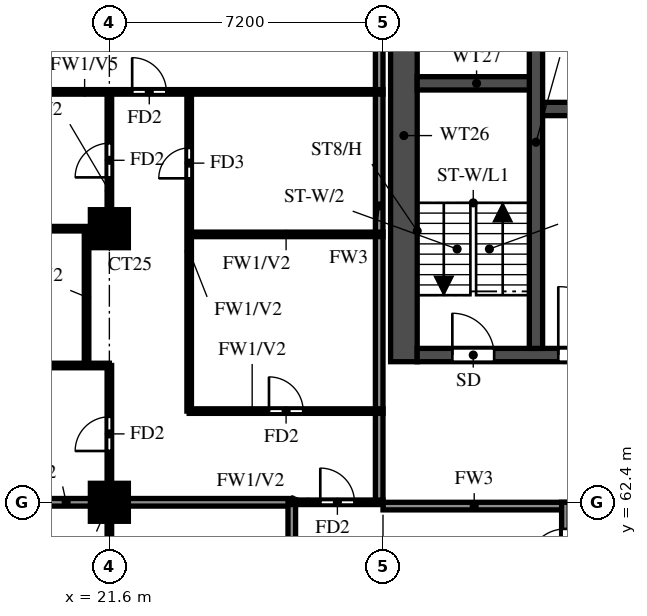
"""IFC4 building model, lengths in metres.
Left out: names, types, materials, properties, quantities, classifications, styles, units other than length and angle.
Written with IfcOpenShell. Run it as: python <this file> out.ifc"""

import sys

from ifc_helpers import new_model, si_unit, direction, frame, frame_2d, origin, origin_2d, place, context, subcontext, project, spatial, rectangle, extrude, source, transform, mapped, element, fill, save


model = new_model("IFC4")
c1 = context("Model", 3, precision=1e-05, world=origin(), true_north=direction((0.0, 1.0)))
c2 = subcontext(c1, "Body", "Model", "MODEL_VIEW")
j1 = project(units=[si_unit("LENGTHUNIT", "METRE"), si_unit("PLANEANGLEUNIT", "RADIAN")], contexts=[c1])
p1 = place(None, origin())
s1 = spatial("IfcSite", under=j1, at=p1, CompositionType="ELEMENT")
p2 = place(p1, origin())
s2 = spatial("IfcBuilding", under=s1, at=p2, CompositionType="ELEMENT")
p3 = place(p2, frame((0.0, 0.0, 167.5)))
s3 = spatial("IfcBuildingStorey", under=s2, at=p3, CompositionType="ELEMENT", Elevation=167.5)
m1 = source(origin(), c2, "Body", "SweptSolid", [
    extrude(rectangle(XDim=1.0, YDim=1.0, at=origin_2d()), origin(), (0.0, 0.0, 1.0), 3.2),
])
for number, where, z_axis, x_axis in (
    (1, (21.6, 62.4, 0.0), (0.0, 0.0, 1.0), (1.0, 0.0, 0.0)),
    (2, (21.6, 69.6, 0.0), (0.0, 0.0, 1.0), (1.0, 0.0, 0.0)),
):
    element("IfcColumn", number, at=place(p3, frame(where, z_axis=z_axis, x_axis=x_axis)), inside=s3, PredefinedType="COLUMN", context=c2, shape_type="MappedRepresentation", body=[
        mapped(m1, transform((0.0, 0.0, 0.0))),
    ])
p4 = place(p3, frame((29.35, 66.1, 0.0), z_axis=(0.0, 0.0, 1.0), x_axis=(0.0, 1.0, 0.0)))
e3 = element("IfcWall", 3, at=p4, inside=s3, PredefinedType="SHEAR", context=c2, shape_type="SweptSolid", body=[
    extrude(rectangle(XDim=11.9, YDim=0.7, at=frame_2d((5.95, 0.0))), origin(), (0.0, 0.0, 1.0), 3.2),
])
p5 = place(p3, frame((29.7, 66.275, 0.0), z_axis=(0.0, 0.0, 1.0), x_axis=(1.0, 0.0, 0.0)))
e4 = element("IfcWall", 4, at=p5, inside=s3, PredefinedType="SHEAR", context=c2, shape_type="SweptSolid", body=[
    extrude(rectangle(XDim=41.4, YDim=0.35, at=frame_2d((20.7, 0.0))), origin(), (0.0, 0.0, 1.0), 3.2),
])
p6 = place(p5, frame((0.925, 0.0, 0.0)))
e5 = element("IfcOpeningElement", 5, at=p6, cuts=e4, PredefinedType="OPENING", context=c2, shape_type="SweptSolid", body=[
    extrude(rectangle(XDim=1.1, YDim=2.1, at=frame_2d((0.55, 1.05))), frame((0.0, 0.185, 0.0), z_axis=(0.0, -1.0, 0.0), x_axis=(1.0, 0.0, 0.0)), (0.0, 0.0, 1.0), 0.37),
])
p7 = place(p5, frame((3.712, 0.0, 0.0)))
e6 = element("IfcOpeningElement", 6, at=p7, cuts=e4, PredefinedType="OPENING", context=c2, shape_type="SweptSolid", body=[
    extrude(rectangle(XDim=1.8, YDim=2.1, at=frame_2d((0.9, 1.05))), frame((0.0, 0.185, 0.0), z_axis=(0.0, -1.0, 0.0), x_axis=(1.0, 0.0, 0.0)), (0.0, 0.0, 1.0), 0.37),
])
p8 = place(p3, frame((32.825, 72.75, 0.0), z_axis=(0.0, 0.0, 1.0), x_axis=(1.0, 0.0, 0.0)))
e7 = element("IfcWall", 7, at=p8, inside=s3, PredefinedType="SHEAR", context=c2, shape_type="SweptSolid", body=[
    extrude(rectangle(XDim=35.15, YDim=0.35, at=frame_2d((17.575, 0.0))), origin(), (0.0, 0.0, 1.0), 3.2),
])
p9 = place(p8, frame((19.8, 0.0, 0.0)))
e8 = element("IfcOpeningElement", 8, at=p9, cuts=e7, PredefinedType="OPENING", context=c2, shape_type="SweptSolid", body=[
    extrude(rectangle(XDim=1.1, YDim=2.1, at=frame_2d((0.55, 1.05))), frame((0.0, 0.185, 0.0), z_axis=(0.0, -1.0, 0.0), x_axis=(1.0, 0.0, 0.0)), (0.0, 0.0, 1.0), 0.37),
])
p10 = place(p8, frame((27.7, 0.0, 0.0)))
e9 = element("IfcOpeningElement", 9, at=p10, cuts=e7, PredefinedType="OPENING", context=c2, shape_type="SweptSolid", body=[
    extrude(rectangle(XDim=1.1, YDim=2.1, at=frame_2d((0.55, 1.05))), frame((0.0, 0.185, 0.0), z_axis=(0.0, -1.0, 0.0), x_axis=(1.0, 0.0, 0.0)), (0.0, 0.0, 1.0), 0.37),
])
p11 = place(p8, frame((30.3, 0.0, 0.0)))
e10 = element("IfcOpeningElement", 10, at=p11, cuts=e7, PredefinedType="OPENING", context=c2, shape_type="SweptSolid", body=[
    extrude(rectangle(XDim=1.1, YDim=2.1, at=frame_2d((0.55, 1.05))), frame((0.0, 0.185, 0.0), z_axis=(0.0, -1.0, 0.0), x_axis=(1.0, 0.0, 0.0)), (0.0, 0.0, 1.0), 0.37),
])
p12 = place(p8, frame((3.8, 0.0, 0.0)))
e11 = element("IfcOpeningElement", 11, at=p12, cuts=e7, PredefinedType="OPENING", context=c2, shape_type="SweptSolid", body=[
    extrude(rectangle(XDim=1.1, YDim=2.1, at=frame_2d((0.55, 1.05))), frame((0.0, 0.185, 0.0), z_axis=(0.0, -1.0, 0.0), x_axis=(1.0, 0.0, 0.0)), (0.0, 0.0, 1.0), 0.37),
])
p13 = place(p8, frame((6.55, 0.0, 0.0)))
e12 = element("IfcOpeningElement", 12, at=p13, cuts=e7, PredefinedType="OPENING", context=c2, shape_type="SweptSolid", body=[
    extrude(rectangle(XDim=1.1, YDim=2.1, at=frame_2d((0.55, 1.05))), frame((0.0, 0.185, 0.0), z_axis=(0.0, -1.0, 0.0), x_axis=(1.0, 0.0, 0.0)), (0.0, 0.0, 1.0), 0.37),
])
p14 = place(p8, frame((9.3, 0.0, 0.0)))
e13 = element("IfcOpeningElement", 13, at=p14, cuts=e7, PredefinedType="OPENING", context=c2, shape_type="SweptSolid", body=[
    extrude(rectangle(XDim=1.1, YDim=2.1, at=frame_2d((0.55, 1.05))), frame((0.0, 0.185, 0.0), z_axis=(0.0, -1.0, 0.0), x_axis=(1.0, 0.0, 0.0)), (0.0, 0.0, 1.0), 0.37),
])
p15 = place(p8, frame((12.05, 0.0, 0.0)))
e14 = element("IfcOpeningElement", 14, at=p15, cuts=e7, PredefinedType="OPENING", context=c2, shape_type="SweptSolid", body=[
    extrude(rectangle(XDim=1.1, YDim=2.1, at=frame_2d((0.55, 1.05))), frame((0.0, 0.185, 0.0), z_axis=(0.0, -1.0, 0.0), x_axis=(1.0, 0.0, 0.0)), (0.0, 0.0, 1.0), 0.37),
])
p16 = place(p8, frame((14.8, 0.0, 0.0)))
e15 = element("IfcOpeningElement", 15, at=p16, cuts=e7, PredefinedType="OPENING", context=c2, shape_type="SweptSolid", body=[
    extrude(rectangle(XDim=1.1, YDim=2.1, at=frame_2d((0.55, 1.05))), frame((0.0, 0.185, 0.0), z_axis=(0.0, -1.0, 0.0), x_axis=(1.0, 0.0, 0.0)), (0.0, 0.0, 1.0), 0.37),
])
p17 = place(p8, frame((17.55, 0.0, 0.0)))
e16 = element("IfcOpeningElement", 16, at=p17, cuts=e7, PredefinedType="OPENING", context=c2, shape_type="SweptSolid", body=[
    extrude(rectangle(XDim=1.1, YDim=2.1, at=frame_2d((0.55, 1.05))), frame((0.0, 0.185, 0.0), z_axis=(0.0, -1.0, 0.0), x_axis=(1.0, 0.0, 0.0)), (0.0, 0.0, 1.0), 0.37),
])
p18 = place(p8, frame((0.938, 0.0, 0.0)))
e17 = element("IfcOpeningElement", 17, at=p18, cuts=e7, PredefinedType="OPENING", context=c2, shape_type="SweptSolid", body=[
    extrude(rectangle(XDim=1.1, YDim=2.1, at=frame_2d((0.55, 1.05))), frame((0.0, 0.185, 0.0), z_axis=(0.0, -1.0, 0.0), x_axis=(1.0, 0.0, 0.0)), (0.0, 0.0, 1.0), 0.37),
])
p19 = place(p3, frame((29.7, 73.425, 0.0), z_axis=(0.0, 0.0, 1.0), x_axis=(1.0, 0.0, 0.0)))
e18 = element("IfcWall", 18, at=p19, inside=s3, PredefinedType="SHEAR", context=c2, shape_type="SweptSolid", body=[
    extrude(rectangle(XDim=3.125, YDim=0.35, at=frame_2d((1.562, 0.0))), origin(), (0.0, 0.0, 1.0), 3.2),
])
p20 = place(p3, frame((32.825, 66.45, 0.0), z_axis=(0.0, 0.0, 1.0), x_axis=(0.0, 1.0, 0.0)))
e19 = element("IfcWall", 19, at=p20, inside=s3, PredefinedType="SHEAR", context=c2, shape_type="SweptSolid", body=[
    extrude(rectangle(XDim=10.85, YDim=0.35, at=frame_2d((5.425, 0.0))), origin(), (0.0, 0.0, 1.0), 3.2),
])
p21 = place(p3, frame((28.8, 62.3, 0.0), z_axis=(0.0, 0.0, 1.0), x_axis=(1.0, 0.0, 0.0)))
e20 = element("IfcWall", 20, at=p21, inside=s3, PredefinedType="SOLIDWALL", context=c2, shape_type="SweptSolid", body=[
    extrude(rectangle(XDim=4.8, YDim=0.2, at=frame_2d((2.4, 0.0))), origin(), (0.0, 0.0, 1.0), 3.2),
])
p22 = place(p3, frame((28.7, 62.4, 0.0), z_axis=(0.0, 0.0, 1.0), x_axis=(0.0, 1.0, 0.0)))
e21 = element("IfcWall", 21, at=p22, inside=s3, PredefinedType="SOLIDWALL", context=c2, shape_type="SweptSolid", body=[
    extrude(rectangle(XDim=15.6, YDim=0.2, at=frame_2d((7.8, 0.0))), origin(), (0.0, 0.0, 1.0), 3.2),
])
p23 = place(p3, frame((33.6, 60.0, 0.0), z_axis=(0.0, 0.0, 1.0), x_axis=(0.0, 1.0, 0.0)))
e22 = element("IfcWall", 22, at=p23, inside=s3, PredefinedType="SOLIDWALL", context=c2, shape_type="SweptSolid", body=[
    extrude(rectangle(XDim=2.4, YDim=0.2, at=frame_2d((1.2, 0.0))), origin(), (0.0, 0.0, 1.0), 3.2),
])
p24 = place(p23, frame((0.7, 0.0, 0.0)))
e23 = element("IfcOpeningElement", 23, at=p24, cuts=e22, PredefinedType="OPENING", context=c2, shape_type="SweptSolid", body=[
    extrude(rectangle(XDim=1.0, YDim=2.1, at=frame_2d((0.5, 1.05))), frame((0.0, 0.11, 0.0), z_axis=(0.0, -1.0, 0.0), x_axis=(1.0, 0.0, 0.0)), (0.0, 0.0, 1.0), 0.22),
])
p25 = place(p3, frame((14.525, 62.4, 0.0), z_axis=(0.0, 0.0, 1.0), x_axis=(1.0, 0.0, 0.0)))
e24 = element("IfcWall", 24, at=p25, inside=s3, PredefinedType="SOLIDWALL", context=c2, shape_type="SweptSolid", body=[
    extrude(rectangle(XDim=11.875, YDim=0.2, at=frame_2d((5.938, 0.0))), origin(), (0.0, 0.0, 1.0), 3.2),
])
p26 = place(p3, frame((26.4, 60.0, 0.0), z_axis=(0.0, 0.0, 1.0), x_axis=(0.0, 1.0, 0.0)))
e25 = element("IfcWall", 25, at=p26, inside=s3, PredefinedType="SOLIDWALL", context=c2, shape_type="SweptSolid", body=[
    extrude(rectangle(XDim=2.4, YDim=0.2, at=frame_2d((1.2, 0.0))), origin(), (0.0, 0.0, 1.0), 3.2),
])
p27 = place(p3, frame((26.4, 62.4, 0.0), z_axis=(0.0, 0.0, 1.0), x_axis=(1.0, 0.0, 0.0)))
e26 = element("IfcWall", 26, at=p27, inside=s3, PredefinedType="PARTITIONING", context=c2, shape_type="SweptSolid", body=[
    extrude(rectangle(XDim=2.4, YDim=0.12, at=frame_2d((1.2, 0.0))), origin(), (0.0, 0.0, 1.0), 3.2),
])
p28 = place(p27, frame((0.75, 0.0, 0.0)))
e27 = element("IfcOpeningElement", 27, at=p28, cuts=e26, PredefinedType="OPENING", context=c2, shape_type="SweptSolid", body=[
    extrude(rectangle(XDim=0.9, YDim=2.1, at=frame_2d((0.45, 1.05))), frame((0.0, 0.07, 0.0), z_axis=(0.0, -1.0, 0.0), x_axis=(1.0, 0.0, 0.0)), (0.0, 0.0, 1.0), 0.14),
])
p29 = place(p3, frame((23.7, 64.8, 0.0), z_axis=(0.0, 0.0, 1.0), x_axis=(1.0, 0.0, 0.0)))
e28 = element("IfcWall", 28, at=p29, inside=s3, PredefinedType="PARTITIONING", context=c2, shape_type="SweptSolid", body=[
    extrude(rectangle(XDim=5.1, YDim=0.12, at=frame_2d((2.55, 0.0))), origin(), (0.0, 0.0, 1.0), 3.2),
])
p30 = place(p29, frame((2.1, 0.0, 0.0)))
e29 = element("IfcOpeningElement", 29, at=p30, cuts=e28, PredefinedType="OPENING", context=c2, shape_type="SweptSolid", body=[
    extrude(rectangle(XDim=0.9, YDim=2.1, at=frame_2d((0.45, 1.05))), frame((0.0, 0.07, 0.0), z_axis=(0.0, -1.0, 0.0), x_axis=(1.0, 0.0, 0.0)), (0.0, 0.0, 1.0), 0.14),
])
p31 = place(p3, frame((14.525, 66.0, 0.0), z_axis=(0.0, 0.0, 1.0), x_axis=(1.0, 0.0, 0.0)))
e30 = element("IfcWall", 30, at=p31, inside=s3, PredefinedType="PARTITIONING", context=c2, shape_type="SweptSolid", body=[
    extrude(rectangle(XDim=7.075, YDim=0.12, at=frame_2d((3.538, 0.0))), origin(), (0.0, 0.0, 1.0), 2.3),
])
p32 = place(p31, frame((2.837, 0.0, 0.0)))
e31 = element("IfcOpeningElement", 31, at=p32, cuts=e30, PredefinedType="OPENING", context=c2, shape_type="SweptSolid", body=[
    extrude(rectangle(XDim=0.8, YDim=2.1, at=frame_2d((0.4, 1.05))), frame((0.0, 0.07, 0.0), z_axis=(0.0, -1.0, 0.0), x_axis=(1.0, 0.0, 0.0)), (0.0, 0.0, 1.0), 0.14),
])
p33 = place(p3, frame((23.7, 69.45, 0.0), z_axis=(0.0, 0.0, 1.0), x_axis=(1.0, 0.0, 0.0)))
e32 = element("IfcWall", 32, at=p33, inside=s3, PredefinedType="PARTITIONING", context=c2, shape_type="SweptSolid", body=[
    extrude(rectangle(XDim=5.1, YDim=0.12, at=frame_2d((2.55, 0.0))), origin(), (0.0, 0.0, 1.0), 3.2),
])
p34 = place(p3, frame((14.525, 69.6, 0.0), z_axis=(0.0, 0.0, 1.0), x_axis=(1.0, 0.0, 0.0)))
e33 = element("IfcWall", 33, at=p34, inside=s3, PredefinedType="PARTITIONING", context=c2, shape_type="SweptSolid", body=[
    extrude(rectangle(XDim=7.075, YDim=0.12, at=frame_2d((3.538, 0.0))), origin(), (0.0, 0.0, 1.0), 3.2),
])
p35 = place(p3, frame((14.525, 73.2, 0.0), z_axis=(0.0, 0.0, 1.0), x_axis=(1.0, 0.0, 0.0)))
e34 = element("IfcWall", 34, at=p35, inside=s3, PredefinedType="PARTITIONING", context=c2, shape_type="SweptSolid", body=[
    extrude(rectangle(XDim=14.275, YDim=0.12, at=frame_2d((7.138, 0.0))), origin(), (0.0, 0.0, 1.0), 2.3),
])
p36 = place(p35, frame((7.675, 0.0, 0.0)))
e35 = element("IfcOpeningElement", 35, at=p36, cuts=e34, PredefinedType="OPENING", context=c2, shape_type="SweptSolid", body=[
    extrude(rectangle(XDim=0.9, YDim=2.1, at=frame_2d((0.45, 1.05))), frame((0.0, 0.07, 0.0), z_axis=(0.0, -1.0, 0.0), x_axis=(1.0, 0.0, 0.0)), (0.0, 0.0, 1.0), 0.14),
])
p37 = place(p3, frame((21.0, 66.0, 0.0), z_axis=(0.0, 0.0, 1.0), x_axis=(0.0, 1.0, 0.0)))
e36 = element("IfcWall", 36, at=p37, inside=s3, PredefinedType="PARTITIONING", context=c2, shape_type="SweptSolid", body=[
    extrude(rectangle(XDim=3.6, YDim=0.12, at=frame_2d((1.8, 0.0))), origin(), (0.0, 0.0, 1.0), 3.2),
])
p38 = place(p3, frame((21.6, 55.2, 0.0), z_axis=(0.0, 0.0, 1.0), x_axis=(0.0, 1.0, 0.0)))
e37 = element("IfcWall", 37, at=p38, inside=s3, PredefinedType="PARTITIONING", context=c2, shape_type="SweptSolid", body=[
    extrude(rectangle(XDim=10.8, YDim=0.12, at=frame_2d((5.4, 0.0))), origin(), (0.0, 0.0, 1.0), 3.2),
])
p39 = place(p38, frame((2.85, 0.0, 0.0)))
e38 = element("IfcOpeningElement", 38, at=p39, cuts=e37, PredefinedType="OPENING", context=c2, shape_type="SweptSolid", body=[
    extrude(rectangle(XDim=1.5, YDim=2.1, at=frame_2d((0.75, 1.05))), frame((0.0, 0.07, 0.0), z_axis=(0.0, -1.0, 0.0), x_axis=(1.0, 0.0, 0.0)), (0.0, 0.0, 1.0), 0.14),
])
p40 = place(p38, frame((8.55, 0.0, 0.0)))
e39 = element("IfcOpeningElement", 39, at=p40, cuts=e37, PredefinedType="OPENING", context=c2, shape_type="SweptSolid", body=[
    extrude(rectangle(XDim=0.9, YDim=2.1, at=frame_2d((0.45, 1.05))), frame((0.0, 0.07, 0.0), z_axis=(0.0, -1.0, 0.0), x_axis=(1.0, 0.0, 0.0)), (0.0, 0.0, 1.0), 0.14),
])
p41 = place(p3, frame((21.6, 69.6, 0.0), z_axis=(0.0, 0.0, 1.0), x_axis=(0.0, 1.0, 0.0)))
e40 = element("IfcWall", 40, at=p41, inside=s3, PredefinedType="PARTITIONING", context=c2, shape_type="SweptSolid", body=[
    extrude(rectangle(XDim=3.6, YDim=0.12, at=frame_2d((1.8, 0.0))), origin(), (0.0, 0.0, 1.0), 3.2),
])
p42 = place(p41, frame((1.35, 0.0, 0.0)))
e41 = element("IfcOpeningElement", 41, at=p42, cuts=e40, PredefinedType="OPENING", context=c2, shape_type="SweptSolid", body=[
    extrude(rectangle(XDim=0.9, YDim=2.1, at=frame_2d((0.45, 1.05))), frame((0.0, 0.07, 0.0), z_axis=(0.0, -1.0, 0.0), x_axis=(1.0, 0.0, 0.0)), (0.0, 0.0, 1.0), 0.14),
])
p43 = place(p3, frame((23.7, 64.8, 0.0), z_axis=(0.0, 0.0, 1.0), x_axis=(0.0, 1.0, 0.0)))
e42 = element("IfcWall", 42, at=p43, inside=s3, PredefinedType="PARTITIONING", context=c2, shape_type="SweptSolid", body=[
    extrude(rectangle(XDim=8.4, YDim=0.12, at=frame_2d((4.2, 0.0))), origin(), (0.0, 0.0, 1.0), 3.2),
])
p44 = place(p43, frame((6.125, 0.0, 0.0)))
e43 = element("IfcOpeningElement", 43, at=p44, cuts=e42, PredefinedType="OPENING", context=c2, shape_type="SweptSolid", body=[
    extrude(rectangle(XDim=0.8, YDim=2.1, at=frame_2d((0.4, 1.05))), frame((0.0, 0.07, 0.0), z_axis=(0.0, -1.0, 0.0), x_axis=(1.0, 0.0, 0.0)), (0.0, 0.0, 1.0), 0.14),
])
p45 = place(p6, origin())
e44 = element("IfcDoor", 44, at=p45, inside=s3, OperationType="SINGLE_SWING_LEFT", PredefinedType="DOOR", context=c2, shape_type="SweptSolid", body=[
    extrude(rectangle(XDim=1.1, YDim=2.1, at=frame_2d((0.55, 1.05))), frame((0.0, 0.025, 0.0), z_axis=(0.0, -1.0, 0.0), x_axis=(1.0, 0.0, 0.0)), (0.0, 0.0, 1.0), 0.05),
])
fill(e5, e44)
p46 = place(p7, origin())
e45 = element("IfcDoor", 45, at=p46, inside=s3, OperationType="DOUBLE_DOOR_SINGLE_SWING", PredefinedType="DOOR", context=c2, shape_type="SweptSolid", body=[
    extrude(rectangle(XDim=1.8, YDim=2.1, at=frame_2d((0.9, 1.05))), frame((0.0, 0.025, 0.0), z_axis=(0.0, -1.0, 0.0), x_axis=(1.0, 0.0, 0.0)), (0.0, 0.0, 1.0), 0.05),
])
fill(e6, e45)
p47 = place(p28, origin())
e46 = element("IfcDoor", 46, at=p47, inside=s3, OperationType="SINGLE_SWING_LEFT", PredefinedType="DOOR", context=c2, shape_type="SweptSolid", body=[
    extrude(rectangle(XDim=0.9, YDim=2.1, at=frame_2d((0.45, 1.05))), frame((0.0, 0.025, 0.0), z_axis=(0.0, -1.0, 0.0), x_axis=(1.0, 0.0, 0.0)), (0.0, 0.0, 1.0), 0.05),
])
fill(e27, e46)
p48 = place(p24, origin())
e47 = element("IfcDoor", 47, at=p48, inside=s3, OperationType="SINGLE_SWING_RIGHT", PredefinedType="DOOR", context=c2, shape_type="SweptSolid", body=[
    extrude(rectangle(XDim=1.0, YDim=2.1, at=frame_2d((0.5, 1.05))), frame((0.0, 0.025, 0.0), z_axis=(0.0, -1.0, 0.0), x_axis=(1.0, 0.0, 0.0)), (0.0, 0.0, 1.0), 0.05),
])
fill(e23, e47)
p49 = place(p40, origin())
e48 = element("IfcDoor", 48, at=p49, inside=s3, OperationType="SINGLE_SWING_LEFT", PredefinedType="DOOR", context=c2, shape_type="SweptSolid", body=[
    extrude(rectangle(XDim=0.9, YDim=2.1, at=frame_2d((0.45, 1.05))), frame((0.0, 0.025, 0.0), z_axis=(0.0, -1.0, 0.0), x_axis=(1.0, 0.0, 0.0)), (0.0, 0.0, 1.0), 0.05),
])
fill(e39, e48)
p50 = place(p42, origin())
e49 = element("IfcDoor", 49, at=p50, inside=s3, OperationType="SINGLE_SWING_RIGHT", PredefinedType="DOOR", context=c2, shape_type="SweptSolid", body=[
    extrude(rectangle(XDim=0.9, YDim=2.1, at=frame_2d((0.45, 1.05))), frame((0.0, 0.025, 0.0), z_axis=(0.0, -1.0, 0.0), x_axis=(1.0, 0.0, 0.0)), (0.0, 0.0, 1.0), 0.05),
])
fill(e41, e49)
p51 = place(p36, origin())
e50 = element("IfcDoor", 50, at=p51, inside=s3, OperationType="SINGLE_SWING_LEFT", PredefinedType="DOOR", context=c2, shape_type="SweptSolid", body=[
    extrude(rectangle(XDim=0.9, YDim=2.1, at=frame_2d((0.45, 1.05))), frame((0.0, 0.025, 0.0), z_axis=(0.0, -1.0, 0.0), x_axis=(1.0, 0.0, 0.0)), (0.0, 0.0, 1.0), 0.05),
])
fill(e35, e50)
p52 = place(p30, origin())
e51 = element("IfcDoor", 51, at=p52, inside=s3, OperationType="SINGLE_SWING_LEFT", PredefinedType="DOOR", context=c2, shape_type="SweptSolid", body=[
    extrude(rectangle(XDim=0.9, YDim=2.1, at=frame_2d((0.45, 1.05))), frame((0.0, 0.025, 0.0), z_axis=(0.0, -1.0, 0.0), x_axis=(1.0, 0.0, 0.0)), (0.0, 0.0, 1.0), 0.05),
])
fill(e29, e51)
p53 = place(p44, origin())
e52 = element("IfcDoor", 52, at=p53, inside=s3, OperationType="SINGLE_SWING_RIGHT", PredefinedType="DOOR", context=c2, shape_type="SweptSolid", body=[
    extrude(rectangle(XDim=0.8, YDim=2.1, at=frame_2d((0.4, 1.05))), frame((0.0, 0.025, 0.0), z_axis=(0.0, -1.0, 0.0), x_axis=(1.0, 0.0, 0.0)), (0.0, 0.0, 1.0), 0.05),
])
fill(e43, e52)
save(model, sys.argv[1])
